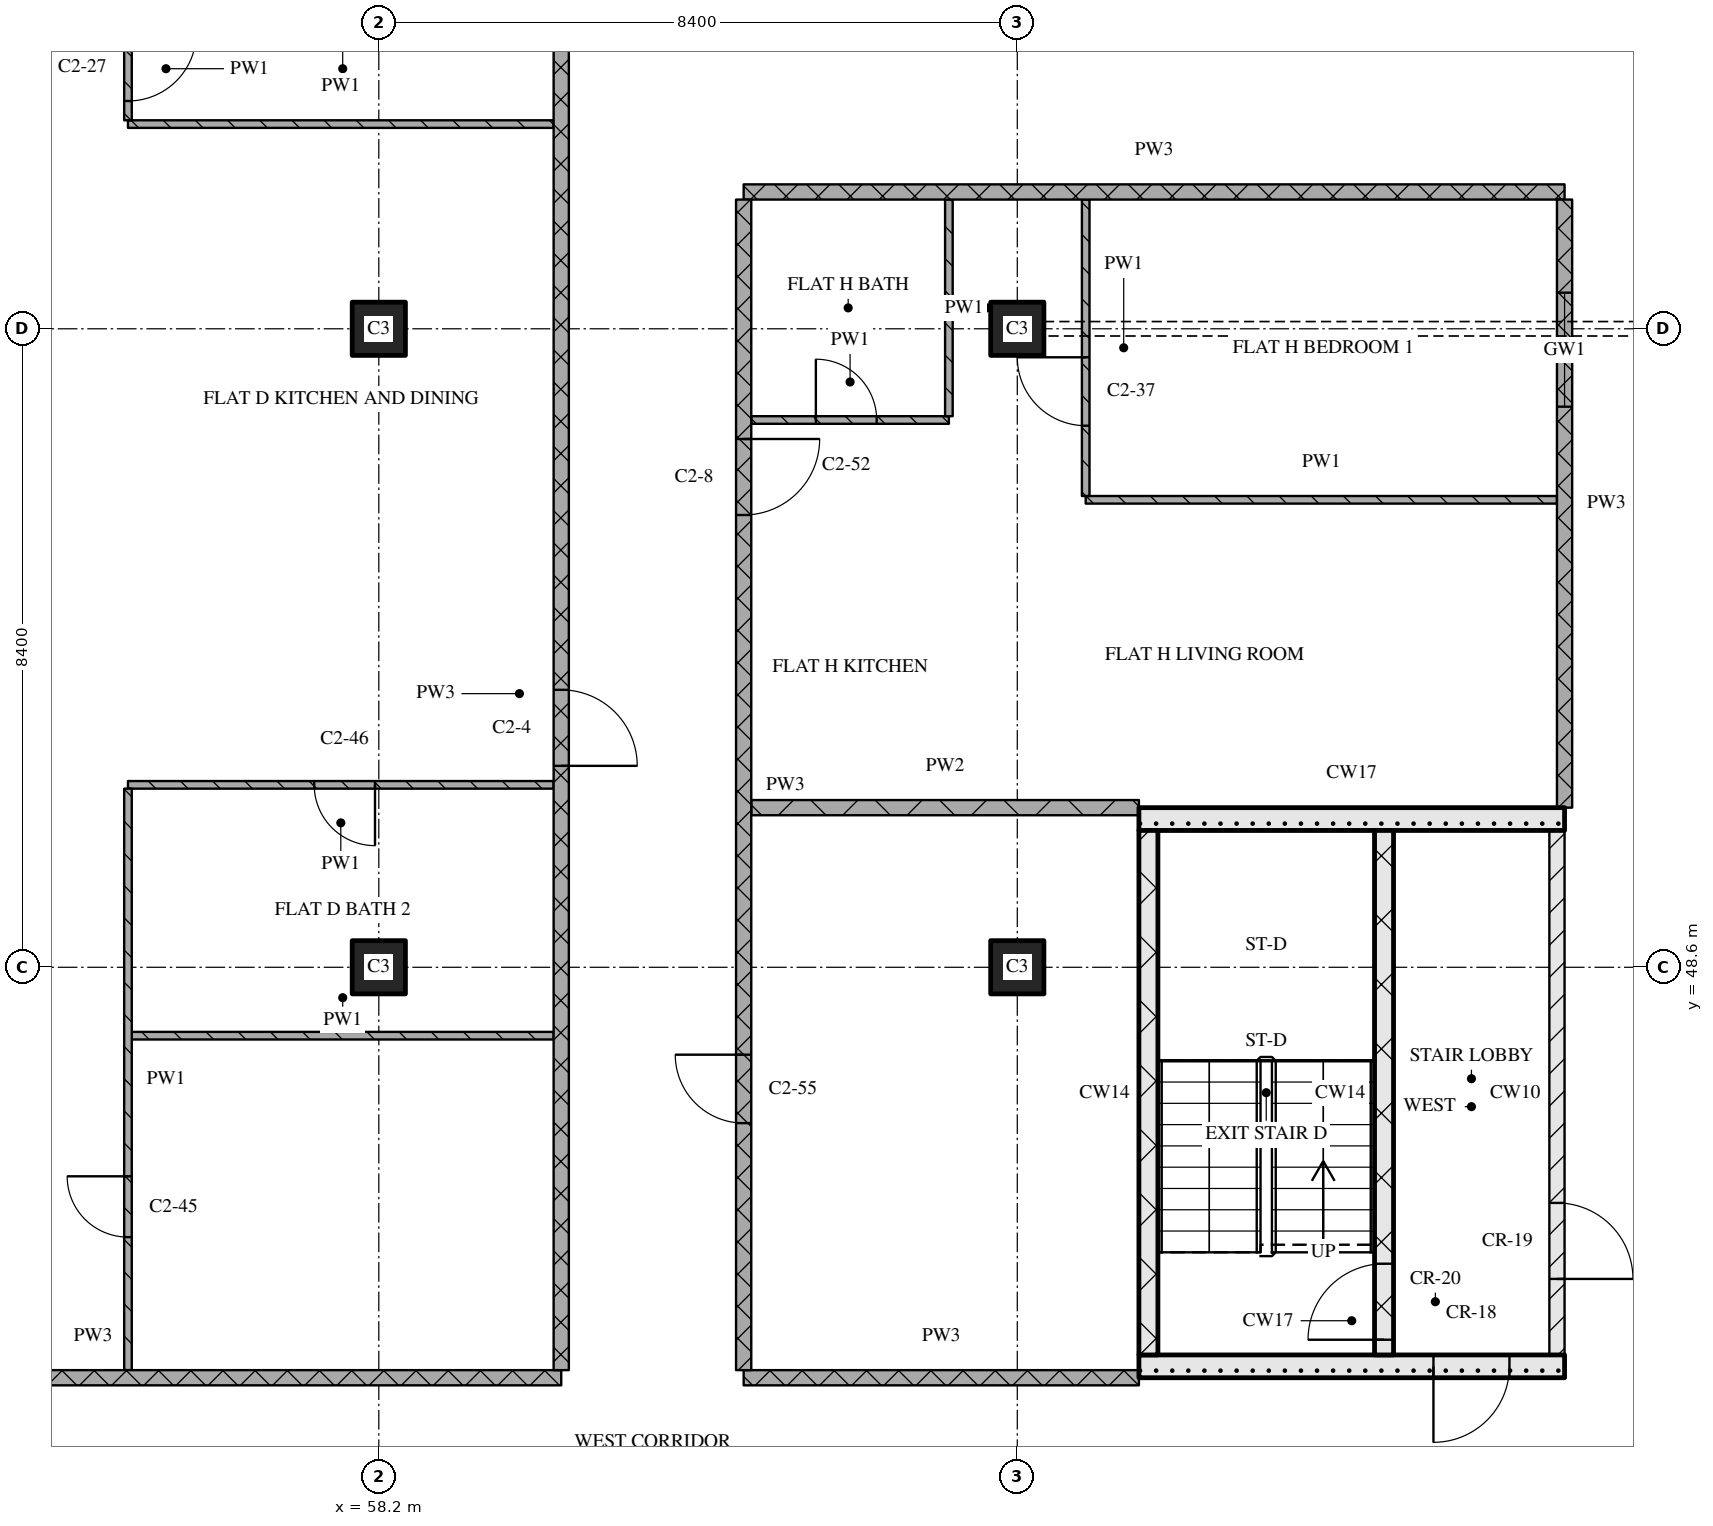
"""IFC4 building model, lengths in metres.
Left out: names, types, materials, properties, quantities, classifications, styles, units other than length and angle.
Written with IfcOpenShell. Run it as: python <this file> out.ifc"""

import sys

from ifc_helpers import new_model, si_unit, direction, frame, frame_2d, origin, origin_2d, place, context, subcontext, project, spatial, rectangle, extrude, element, fill, save


model = new_model("IFC4")
c1 = context("Model", 3, precision=1e-05, world=origin(), true_north=direction((0.0, 1.0)))
c2 = subcontext(c1, "Body", "Model", "MODEL_VIEW")
j1 = project(units=[si_unit("LENGTHUNIT", "METRE"), si_unit("PLANEANGLEUNIT", "RADIAN")], contexts=[c1])
p1 = place(None, origin())
s1 = spatial("IfcSite", under=j1, at=p1, CompositionType="ELEMENT")
p2 = place(p1, origin())
s2 = spatial("IfcBuilding", under=s1, at=p2, CompositionType="ELEMENT")
p3 = place(p2, frame((0.0, 0.0, 165.45)))
s3 = spatial("IfcBuildingStorey", under=s2, at=p3, CompositionType="ELEMENT", Elevation=165.45)
for number, where, z_axis, x_axis in (
    (1, (58.2, 48.6, 0.0), (0.0, 0.0, 1.0), (1.0, 0.0, 0.0)),
    (2, (58.2, 57.0, 0.0), (0.0, 0.0, 1.0), (1.0, 0.0, 0.0)),
    (3, (66.6, 48.6, 0.0), (0.0, 0.0, 1.0), (1.0, 0.0, 0.0)),
    (4, (66.6, 57.0, 0.0), (0.0, 0.0, 1.0), (1.0, 0.0, 0.0)),
):
    element("IfcColumn", number, at=place(p3, frame(where, z_axis=z_axis, x_axis=x_axis)), inside=s3, PredefinedType="COLUMN", context=c2, shape_type="SweptSolid", body=[
        extrude(rectangle(XDim=0.7, YDim=0.7, at=origin_2d()), origin(), (0.0, 0.0, 1.0), 3.6),
    ])
p4 = place(p3, frame((68.2, 43.35, 0.0), z_axis=(0.0, 0.0, 1.0), x_axis=(1.0, 0.0, 0.0)))
e5 = element("IfcWall", 5, at=p4, inside=s3, PredefinedType="SOLIDWALL", context=c2, shape_type="SweptSolid", body=[
    extrude(rectangle(XDim=5.6, YDim=0.3, at=frame_2d((2.8, 0.0))), origin(), (0.0, 0.0, 1.0), 3.32),
])
p5 = place(p4, frame((3.875, 0.0, 0.0)))
e6 = element("IfcOpeningElement", 6, at=p5, cuts=e5, PredefinedType="OPENING", context=c2, shape_type="SweptSolid", body=[
    extrude(rectangle(XDim=1.0, YDim=2.1, at=frame_2d((0.5, 1.05))), frame((0.0, 0.16, 0.0), z_axis=(0.0, -1.0, 0.0), x_axis=(1.0, 0.0, 0.0)), (0.0, 0.0, 1.0), 0.32),
])
p6 = place(p3, frame((68.325, 43.5, 0.0), z_axis=(0.0, 0.0, 1.0), x_axis=(0.0, 1.0, 0.0)))
e7 = element("IfcWall", 7, at=p6, inside=s3, PredefinedType="SOLIDWALL", context=c2, shape_type="SweptSolid", body=[
    extrude(rectangle(XDim=6.9, YDim=0.25, at=frame_2d((3.45, 0.0))), origin(), (0.0, 0.0, 1.0), 3.32),
])
p7 = place(p3, frame((71.425, 43.5, 0.0), z_axis=(0.0, 0.0, 1.0), x_axis=(0.0, 1.0, 0.0)))
e8 = element("IfcWall", 8, at=p7, inside=s3, PredefinedType="SOLIDWALL", context=c2, shape_type="SweptSolid", body=[
    extrude(rectangle(XDim=6.9, YDim=0.25, at=frame_2d((3.45, 0.0))), origin(), (0.0, 0.0, 1.0), 3.32),
])
p8 = place(p7, frame((0.2, 0.0, 0.0)))
e9 = element("IfcOpeningElement", 9, at=p8, cuts=e8, PredefinedType="OPENING", context=c2, shape_type="SweptSolid", body=[
    extrude(rectangle(XDim=1.0, YDim=2.1, at=frame_2d((0.5, 1.05))), frame((0.0, 0.135, 0.0), z_axis=(0.0, -1.0, 0.0), x_axis=(1.0, 0.0, 0.0)), (0.0, 0.0, 1.0), 0.27),
])
p9 = place(p3, frame((73.7, 43.5, 0.0), z_axis=(0.0, 0.0, 1.0), x_axis=(0.0, 1.0, 0.0)))
e10 = element("IfcWall", 10, at=p9, inside=s3, PredefinedType="PARTITIONING", context=c2, shape_type="SweptSolid", body=[
    extrude(rectangle(XDim=6.9, YDim=0.2, at=frame_2d((3.45, 0.0))), origin(), (0.0, 0.0, 1.0), 3.32),
])
p10 = place(p9, frame((1.0, 0.0, 0.0)))
e11 = element("IfcOpeningElement", 11, at=p10, cuts=e10, PredefinedType="OPENING", context=c2, shape_type="SweptSolid", body=[
    extrude(rectangle(XDim=1.0, YDim=2.1, at=frame_2d((0.5, 1.05))), frame((0.0, 0.11, 0.0), z_axis=(0.0, -1.0, 0.0), x_axis=(1.0, 0.0, 0.0)), (0.0, 0.0, 1.0), 0.22),
])
p11 = place(p3, frame((68.2, 50.55, 0.0), z_axis=(0.0, 0.0, 1.0), x_axis=(1.0, 0.0, 0.0)))
e12 = element("IfcWall", 12, at=p11, inside=s3, PredefinedType="SOLIDWALL", context=c2, shape_type="SweptSolid", body=[
    extrude(rectangle(XDim=5.6, YDim=0.3, at=frame_2d((2.8, 0.0))), origin(), (0.0, 0.0, 1.0), 3.32),
])
p12 = place(p3, frame((48.28, 43.2, 0.0), z_axis=(0.0, 0.0, 1.0), x_axis=(1.0, 0.0, 0.0)))
e13 = element("IfcWall", 13, at=p12, inside=s3, PredefinedType="PARTITIONING", context=c2, shape_type="SweptSolid", body=[
    extrude(rectangle(XDim=12.32, YDim=0.2, at=frame_2d((6.16, 0.0))), origin(), (0.0, 0.0, 1.0), 3.32),
])
p13 = place(p3, frame((63.0, 43.2, 0.0), z_axis=(0.0, 0.0, 1.0), x_axis=(1.0, 0.0, 0.0)))
e14 = element("IfcWall", 14, at=p13, inside=s3, PredefinedType="PARTITIONING", context=c2, shape_type="SweptSolid", body=[
    extrude(rectangle(XDim=5.2, YDim=0.2, at=frame_2d((2.6, 0.0))), origin(), (0.0, 0.0, 1.0), 3.32),
])
p14 = place(p3, frame((54.95, 47.7, 0.0), z_axis=(0.0, 0.0, 1.0), x_axis=(1.0, 0.0, 0.0)))
e15 = element("IfcWall", 15, at=p14, inside=s3, PredefinedType="PARTITIONING", context=c2, shape_type="SweptSolid", body=[
    extrude(rectangle(XDim=5.55, YDim=0.1, at=frame_2d((2.775, 0.0))), origin(), (0.0, 0.0, 1.0), 3.32),
])
p15 = place(p3, frame((63.1, 50.7, 0.0), z_axis=(0.0, 0.0, 1.0), x_axis=(1.0, 0.0, 0.0)))
e16 = element("IfcWall", 16, at=p15, inside=s3, PredefinedType="PARTITIONING", context=c2, shape_type="SweptSolid", body=[
    extrude(rectangle(XDim=5.1, YDim=0.2, at=frame_2d((2.55, 0.0))), origin(), (0.0, 0.0, 1.0), 3.32),
])
p16 = place(p3, frame((60.5, 51.0, 0.0), z_axis=(0.0, 0.0, 1.0), x_axis=(-1.0, 0.0, 0.0)))
e17 = element("IfcWall", 17, at=p16, inside=s3, PredefinedType="PARTITIONING", context=c2, shape_type="SweptSolid", body=[
    extrude(rectangle(XDim=5.6, YDim=0.1, at=frame_2d((2.8, 0.0))), origin(), (0.0, 0.0, 1.0), 3.32),
])
p17 = place(p16, frame((2.35, 0.0, 0.0)))
e18 = element("IfcOpeningElement", 18, at=p17, cuts=e17, PredefinedType="OPENING", context=c2, shape_type="SweptSolid", body=[
    extrude(rectangle(XDim=0.8, YDim=2.1, at=frame_2d((0.4, 1.05))), frame((0.0, 0.06, 0.0), z_axis=(0.0, -1.0, 0.0), x_axis=(1.0, 0.0, 0.0)), (0.0, 0.0, 1.0), 0.12),
])
p18 = place(p3, frame((67.5, 54.75, 0.0), z_axis=(0.0, 0.0, 1.0), x_axis=(1.0, 0.0, 0.0)))
e19 = element("IfcWall", 19, at=p18, inside=s3, PredefinedType="PARTITIONING", context=c2, shape_type="SweptSolid", body=[
    extrude(rectangle(XDim=6.2, YDim=0.1, at=frame_2d((3.1, 0.0))), origin(), (0.0, 0.0, 1.0), 3.32),
])
p19 = place(p3, frame((63.1, 55.8, 0.0), z_axis=(0.0, 0.0, 1.0), x_axis=(1.0, 0.0, 0.0)))
e20 = element("IfcWall", 20, at=p19, inside=s3, PredefinedType="PARTITIONING", context=c2, shape_type="SweptSolid", body=[
    extrude(rectangle(XDim=2.6, YDim=0.1, at=frame_2d((1.3, 0.0))), origin(), (0.0, 0.0, 1.0), 3.32),
])
p20 = place(p19, frame((0.85, 0.0, 0.0)))
e21 = element("IfcOpeningElement", 21, at=p20, cuts=e20, PredefinedType="OPENING", context=c2, shape_type="SweptSolid", body=[
    extrude(rectangle(XDim=0.8, YDim=2.1, at=frame_2d((0.4, 1.05))), frame((0.0, 0.06, 0.0), z_axis=(0.0, -1.0, 0.0), x_axis=(1.0, 0.0, 0.0)), (0.0, 0.0, 1.0), 0.12),
])
p21 = place(p3, frame((63.0, 58.8, 0.0), z_axis=(0.0, 0.0, 1.0), x_axis=(1.0, 0.0, 0.0)))
e22 = element("IfcWall", 22, at=p21, inside=s3, PredefinedType="PARTITIONING", context=c2, shape_type="SweptSolid", body=[
    extrude(rectangle(XDim=10.8, YDim=0.2, at=frame_2d((5.4, 0.0))), origin(), (0.0, 0.0, 1.0), 3.32),
])
p22 = place(p3, frame((54.9, 59.693, 0.0), z_axis=(0.0, 0.0, 1.0), x_axis=(1.0, 0.0, 0.0)))
e23 = element("IfcWall", 23, at=p22, inside=s3, PredefinedType="PARTITIONING", context=c2, shape_type="SweptSolid", body=[
    extrude(rectangle(XDim=5.6, YDim=0.1, at=frame_2d((2.8, 0.0))), origin(), (0.0, 0.0, 1.0), 3.32),
])
p23 = place(p3, frame((54.9, 50.95, 0.0), z_axis=(0.0, 0.0, 1.0), x_axis=(0.0, -1.0, 0.0)))
e24 = element("IfcWall", 24, at=p23, inside=s3, PredefinedType="PARTITIONING", context=c2, shape_type="SweptSolid", body=[
    extrude(rectangle(XDim=7.65, YDim=0.1, at=frame_2d((3.825, 0.0))), origin(), (0.0, 0.0, 1.0), 3.32),
])
p24 = place(p23, frame((5.1, 0.0, 0.0)))
e25 = element("IfcOpeningElement", 25, at=p24, cuts=e24, PredefinedType="OPENING", context=c2, shape_type="SweptSolid", body=[
    extrude(rectangle(XDim=0.8, YDim=2.1, at=frame_2d((0.4, 1.05))), frame((0.0, 0.06, 0.0), z_axis=(0.0, -1.0, 0.0), x_axis=(1.0, 0.0, 0.0)), (0.0, 0.0, 1.0), 0.12),
])
p25 = place(p3, frame((54.9, 61.1, 0.0), z_axis=(0.0, 0.0, 1.0), x_axis=(0.0, -1.0, 0.0)))
e26 = element("IfcWall", 26, at=p25, inside=s3, PredefinedType="PARTITIONING", context=c2, shape_type="SweptSolid", body=[
    extrude(rectangle(XDim=1.357, YDim=0.1, at=frame_2d((0.679, 0.0))), origin(), (0.0, 0.0, 1.0), 3.32),
])
p26 = place(p25, frame((0.204, 0.0, 0.0)))
e27 = element("IfcOpeningElement", 27, at=p26, cuts=e26, PredefinedType="OPENING", context=c2, shape_type="SweptSolid", body=[
    extrude(rectangle(XDim=0.9, YDim=2.1, at=frame_2d((0.45, 1.05))), frame((0.0, 0.06, 0.0), z_axis=(0.0, -1.0, 0.0), x_axis=(1.0, 0.0, 0.0)), (0.0, 0.0, 1.0), 0.12),
])
p27 = place(p3, frame((60.6, 43.3, 0.0), z_axis=(0.0, 0.0, 1.0), x_axis=(0.0, 1.0, 0.0)))
e28 = element("IfcWall", 28, at=p27, inside=s3, PredefinedType="PARTITIONING", context=c2, shape_type="SweptSolid", body=[
    extrude(rectangle(XDim=17.8, YDim=0.2, at=frame_2d((8.9, 0.0))), origin(), (0.0, 0.0, 1.0), 3.32),
])
p28 = place(p27, frame((7.95, 0.0, 0.0)))
e29 = element("IfcOpeningElement", 29, at=p28, cuts=e28, PredefinedType="OPENING", context=c2, shape_type="SweptSolid", body=[
    extrude(rectangle(XDim=1.0, YDim=2.1, at=frame_2d((0.5, 1.05))), frame((0.0, 0.11, 0.0), z_axis=(0.0, -1.0, 0.0), x_axis=(1.0, 0.0, 0.0)), (0.0, 0.0, 1.0), 0.22),
])
p29 = place(p3, frame((63.0, 58.7, 0.0), z_axis=(0.0, 0.0, 1.0), x_axis=(0.0, -1.0, 0.0)))
e30 = element("IfcWall", 30, at=p29, inside=s3, PredefinedType="PARTITIONING", context=c2, shape_type="SweptSolid", body=[
    extrude(rectangle(XDim=15.4, YDim=0.2, at=frame_2d((7.7, 0.0))), origin(), (0.0, 0.0, 1.0), 3.32),
])
p30 = place(p29, frame((3.15, 0.0, 0.0)))
e31 = element("IfcOpeningElement", 31, at=p30, cuts=e30, PredefinedType="OPENING", context=c2, shape_type="SweptSolid", body=[
    extrude(rectangle(XDim=1.0, YDim=2.1, at=frame_2d((0.5, 1.05))), frame((0.0, 0.11, 0.0), z_axis=(0.0, -1.0, 0.0), x_axis=(1.0, 0.0, 0.0)), (0.0, 0.0, 1.0), 0.22),
])
p31 = place(p29, frame((11.25, 0.0, 0.0)))
e32 = element("IfcOpeningElement", 32, at=p31, cuts=e30, PredefinedType="OPENING", context=c2, shape_type="SweptSolid", body=[
    extrude(rectangle(XDim=0.9, YDim=2.1, at=frame_2d((0.45, 1.05))), frame((0.0, 0.11, 0.0), z_axis=(0.0, -1.0, 0.0), x_axis=(1.0, 0.0, 0.0)), (0.0, 0.0, 1.0), 0.22),
])
p32 = place(p3, frame((65.7, 58.7, 0.0), z_axis=(0.0, 0.0, 1.0), x_axis=(0.0, -1.0, 0.0)))
e33 = element("IfcWall", 33, at=p32, inside=s3, PredefinedType="PARTITIONING", context=c2, shape_type="SweptSolid", body=[
    extrude(rectangle(XDim=2.85, YDim=0.1, at=frame_2d((1.425, 0.0))), origin(), (0.0, 0.0, 1.0), 3.32),
])
p33 = place(p3, frame((67.5, 58.7, 0.0), z_axis=(0.0, 0.0, 1.0), x_axis=(0.0, -1.0, 0.0)))
e34 = element("IfcWall", 34, at=p33, inside=s3, PredefinedType="PARTITIONING", context=c2, shape_type="SweptSolid", body=[
    extrude(rectangle(XDim=3.9, YDim=0.1, at=frame_2d((1.95, 0.0))), origin(), (0.0, 0.0, 1.0), 3.32),
])
p34 = place(p33, frame((2.075, 0.0, 0.0)))
e35 = element("IfcOpeningElement", 35, at=p34, cuts=e34, PredefinedType="OPENING", context=c2, shape_type="SweptSolid", body=[
    extrude(rectangle(XDim=0.9, YDim=2.1, at=frame_2d((0.45, 1.05))), frame((0.0, 0.06, 0.0), z_axis=(0.0, -1.0, 0.0), x_axis=(1.0, 0.0, 0.0)), (0.0, 0.0, 1.0), 0.12),
])
p35 = place(p3, frame((73.8, 58.7, 0.0), z_axis=(0.0, 0.0, 1.0), x_axis=(0.0, -1.0, 0.0)))
e36 = element("IfcWall", 36, at=p35, inside=s3, PredefinedType="PARTITIONING", context=c2, shape_type="SweptSolid", body=[
    extrude(rectangle(XDim=8.0, YDim=0.2, at=frame_2d((4.0, 0.0))), origin(), (0.0, 0.0, 1.0), 3.32),
])
p36 = place(p35, frame((1.225, 0.0, 0.9)))
e37 = element("IfcOpeningElement", 37, at=p36, cuts=e36, PredefinedType="OPENING", context=c2, shape_type="SweptSolid", body=[
    extrude(rectangle(XDim=1.5, YDim=1.5, at=frame_2d((0.75, 0.75))), frame((0.0, 0.11, 0.0), z_axis=(0.0, -1.0, 0.0), x_axis=(1.0, 0.0, 0.0)), (0.0, 0.0, 1.0), 0.22),
])
p37 = place(p5, origin())
e38 = element("IfcDoor", 38, at=p37, inside=s3, OperationType="SINGLE_SWING_RIGHT", PredefinedType="DOOR", context=c2, shape_type="SweptSolid", body=[
    extrude(rectangle(XDim=1.0, YDim=2.1, at=frame_2d((0.5, 1.05))), frame((0.0, 0.025, 0.0), z_axis=(0.0, -1.0, 0.0), x_axis=(1.0, 0.0, 0.0)), (0.0, 0.0, 1.0), 0.05),
])
fill(e6, e38)
p38 = place(p8, origin())
e39 = element("IfcDoor", 39, at=p38, inside=s3, OperationType="SINGLE_SWING_LEFT", PredefinedType="DOOR", context=c2, shape_type="SweptSolid", body=[
    extrude(rectangle(XDim=1.0, YDim=2.1, at=frame_2d((0.5, 1.05))), frame((0.0, 0.025, 0.0), z_axis=(0.0, -1.0, 0.0), x_axis=(1.0, 0.0, 0.0)), (0.0, 0.0, 1.0), 0.05),
])
fill(e9, e39)
p39 = place(p10, origin())
e40 = element("IfcDoor", 40, at=p39, inside=s3, OperationType="SINGLE_SWING_RIGHT", PredefinedType="DOOR", context=c2, shape_type="SweptSolid", body=[
    extrude(rectangle(XDim=1.0, YDim=2.1, at=frame_2d((0.5, 1.05))), frame((0.0, 0.025, 0.0), z_axis=(0.0, -1.0, 0.0), x_axis=(1.0, 0.0, 0.0)), (0.0, 0.0, 1.0), 0.05),
])
fill(e11, e40)
p40 = place(p17, origin())
e41 = element("IfcDoor", 41, at=p40, inside=s3, OperationType="SINGLE_SWING_LEFT", PredefinedType="DOOR", context=c2, shape_type="SweptSolid", body=[
    extrude(rectangle(XDim=0.8, YDim=2.1, at=frame_2d((0.4, 1.05))), frame((0.0, 0.025, 0.0), z_axis=(0.0, -1.0, 0.0), x_axis=(1.0, 0.0, 0.0)), (0.0, 0.0, 1.0), 0.05),
])
fill(e18, e41)
p41 = place(p20, origin())
e42 = element("IfcDoor", 42, at=p41, inside=s3, OperationType="SINGLE_SWING_LEFT", PredefinedType="DOOR", context=c2, shape_type="SweptSolid", body=[
    extrude(rectangle(XDim=0.8, YDim=2.1, at=frame_2d((0.4, 1.05))), frame((0.0, 0.025, 0.0), z_axis=(0.0, -1.0, 0.0), x_axis=(1.0, 0.0, 0.0)), (0.0, 0.0, 1.0), 0.05),
])
fill(e21, e42)
p42 = place(p24, origin())
e43 = element("IfcDoor", 43, at=p42, inside=s3, OperationType="SINGLE_SWING_RIGHT", PredefinedType="DOOR", context=c2, shape_type="SweptSolid", body=[
    extrude(rectangle(XDim=0.8, YDim=2.1, at=frame_2d((0.4, 1.05))), frame((0.0, 0.025, 0.0), z_axis=(0.0, -1.0, 0.0), x_axis=(1.0, 0.0, 0.0)), (0.0, 0.0, 1.0), 0.05),
])
fill(e25, e43)
p43 = place(p26, origin())
e44 = element("IfcDoor", 44, at=p43, inside=s3, OperationType="SINGLE_SWING_LEFT", PredefinedType="DOOR", context=c2, shape_type="SweptSolid", body=[
    extrude(rectangle(XDim=0.9, YDim=2.1, at=frame_2d((0.45, 1.05))), frame((0.0, 0.025, 0.0), z_axis=(0.0, -1.0, 0.0), x_axis=(1.0, 0.0, 0.0)), (0.0, 0.0, 1.0), 0.05),
])
fill(e27, e44)
p44 = place(p28, origin())
e45 = element("IfcDoor", 45, at=p44, inside=s3, OperationType="SINGLE_SWING_RIGHT", PredefinedType="DOOR", context=c2, shape_type="SweptSolid", body=[
    extrude(rectangle(XDim=1.0, YDim=2.1, at=frame_2d((0.5, 1.05))), frame((0.0, 0.025, 0.0), z_axis=(0.0, -1.0, 0.0), x_axis=(1.0, 0.0, 0.0)), (0.0, 0.0, 1.0), 0.05),
])
fill(e29, e45)
p45 = place(p30, origin())
e46 = element("IfcDoor", 46, at=p45, inside=s3, OperationType="SINGLE_SWING_LEFT", PredefinedType="DOOR", context=c2, shape_type="SweptSolid", body=[
    extrude(rectangle(XDim=1.0, YDim=2.1, at=frame_2d((0.5, 1.05))), frame((0.0, 0.025, 0.0), z_axis=(0.0, -1.0, 0.0), x_axis=(1.0, 0.0, 0.0)), (0.0, 0.0, 1.0), 0.05),
])
fill(e31, e46)
p46 = place(p31, origin())
e47 = element("IfcDoor", 47, at=p46, inside=s3, OperationType="SINGLE_SWING_RIGHT", PredefinedType="DOOR", context=c2, shape_type="SweptSolid", body=[
    extrude(rectangle(XDim=0.9, YDim=2.1, at=frame_2d((0.45, 1.05))), frame((0.0, 0.025, 0.0), z_axis=(0.0, -1.0, 0.0), x_axis=(1.0, 0.0, 0.0)), (0.0, 0.0, 1.0), 0.05),
])
fill(e32, e47)
p47 = place(p34, origin())
e48 = element("IfcDoor", 48, at=p47, inside=s3, OperationType="SINGLE_SWING_RIGHT", PredefinedType="DOOR", context=c2, shape_type="SweptSolid", body=[
    extrude(rectangle(XDim=0.9, YDim=2.1, at=frame_2d((0.45, 1.05))), frame((0.0, 0.025, 0.0), z_axis=(0.0, -1.0, 0.0), x_axis=(1.0, 0.0, 0.0)), (0.0, 0.0, 1.0), 0.05),
])
fill(e35, e48)
p48 = place(p36, origin())
e49 = element("IfcWindow", 49, at=p48, inside=s3, PartitioningType="SINGLE_PANEL", PredefinedType="WINDOW", context=c2, shape_type="SweptSolid", body=[
    extrude(rectangle(XDim=1.5, YDim=1.5, at=frame_2d((0.75, 0.75))), frame((0.0, 0.03, 0.0), z_axis=(0.0, -1.0, 0.0), x_axis=(1.0, 0.0, 0.0)), (0.0, 0.0, 1.0), 0.06),
])
fill(e37, e49)
save(model, sys.argv[1])
